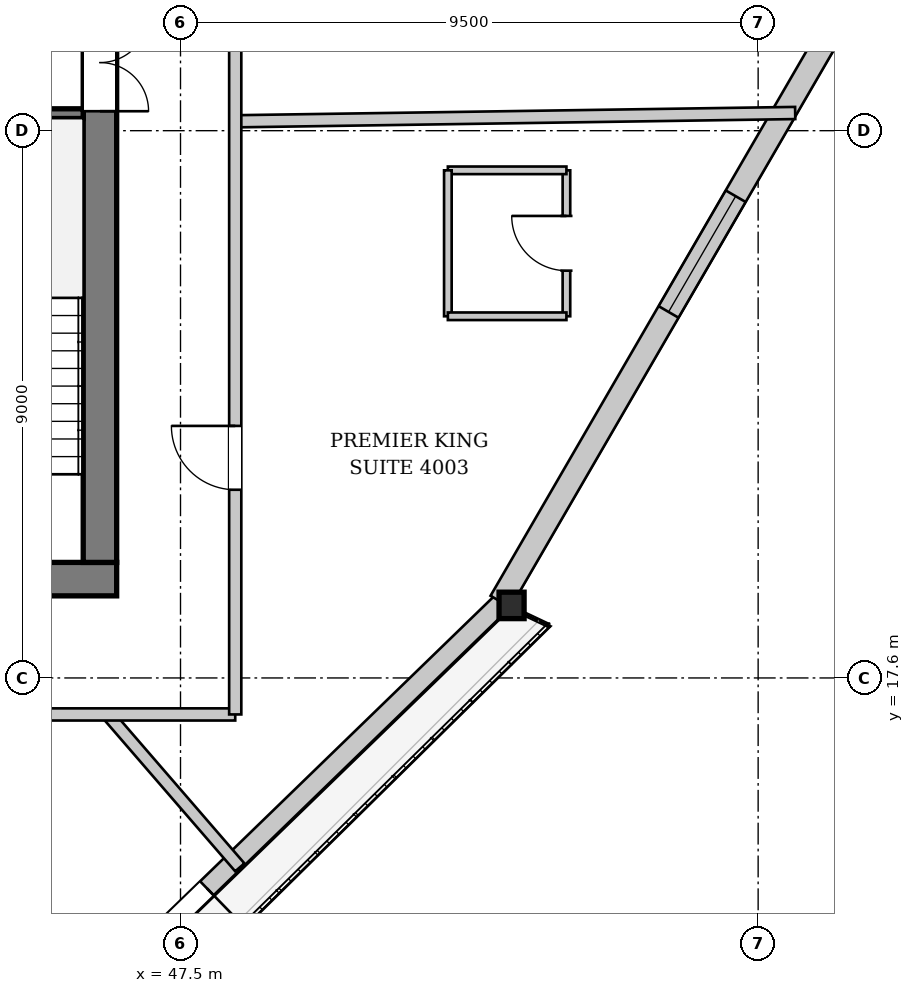
"""IFC4 building model, lengths in metres.
Left out: names, types, materials, properties, quantities, classifications, styles, units other than length and angle.
Written with IfcOpenShell. Run it as: python <this file> out.ifc"""

import sys

from ifc_helpers import new_model, si_unit, direction, frame, frame_2d, origin, origin_2d, place, context, subcontext, project, spatial, rectangle, i_section, extrude, source, transform, mapped, element, fill, save


model = new_model("IFC4")
c1 = context("Model", 3, precision=1e-05, world=origin(), true_north=direction((0.0, 1.0)))
c2 = subcontext(c1, "Body", "Model", "MODEL_VIEW")
j1 = project(units=[si_unit("LENGTHUNIT", "METRE"), si_unit("PLANEANGLEUNIT", "RADIAN")], contexts=[c1])
p1 = place(None, origin())
s1 = spatial("IfcSite", under=j1, at=p1, CompositionType="ELEMENT")
p2 = place(p1, origin())
s2 = spatial("IfcBuilding", under=s1, at=p2, CompositionType="ELEMENT")
p3 = place(p2, frame((0.0, 0.0, 153.7)))
s3 = spatial("IfcBuildingStorey", under=s2, at=p3, CompositionType="ELEMENT", Elevation=153.7)
m1 = source(origin(), c2, "Body", "SweptSolid", [
    extrude(i_section(OverallWidth=0.412, OverallDepth=0.435, WebThickness=0.031, FlangeThickness=0.05, at=origin_2d()), origin(), (0.0, 0.0, 1.0), 3.386),
])
p4 = place(p3, frame((52.928, 18.76, 0.0), z_axis=(0.010094981333, 0.019252571542, 0.999763686999), x_axis=(-0.885636687286, 0.464378787341, 0.0)))
e1 = element("IfcColumn", 1, at=p4, inside=s3, PredefinedType="COLUMN", context=c2, shape_type="MappedRepresentation", body=[
    mapped(m1, transform((0.0, 0.0, 0.0), x_axis=(1.0, 0.0, 0.0), y_axis=(0.0, 1.0, 0.0), z_axis=(0.0, 0.0, 1.0), scale=1.0)),
])
p5 = place(p3, frame((52.816, 18.875, 0.0), z_axis=(0.0, 0.0, 1.0), x_axis=(-0.717927185301, -0.696118205914, 0.0)))
e2 = element("IfcWall", 2, at=p5, inside=s3, PredefinedType="SOLIDWALL", context=c2, shape_type="SweptSolid", body=[
    extrude(rectangle(XDim=23.598, YDim=0.32, at=frame_2d((11.799, 0.0))), origin(), (0.0, 0.0, 1.0), 2.692),
])
p6 = place(p5, frame((6.801, 0.0, 0.0)))
e3 = element("IfcOpeningElement", 3, at=p6, cuts=e2, PredefinedType="OPENING", context=c2, shape_type="SweptSolid", body=[
    extrude(rectangle(XDim=1.5, YDim=2.3, at=frame_2d((0.75, 1.15))), frame((0.0, 0.17, 0.0), z_axis=(0.0, -1.0, 0.0), x_axis=(1.0, 0.0, 0.0)), (0.0, 0.0, 1.0), 0.34),
])
p7 = place(p5, frame((16.163, 0.0, 0.25)))
e4 = element("IfcOpeningElement", 4, at=p7, cuts=e2, PredefinedType="OPENING", context=c2, shape_type="SweptSolid", body=[
    extrude(rectangle(XDim=2.6, YDim=2.35, at=frame_2d((1.3, 1.175))), frame((0.0, 0.17, 0.0), z_axis=(0.0, -1.0, 0.0), x_axis=(1.0, 0.0, 0.0)), (0.0, 0.0, 1.0), 0.34),
])
p8 = place(p3, frame((64.604, 39.268, 0.0), z_axis=(0.0, 0.0, 1.0), x_axis=(-0.501770576444, -0.865000744864, 0.0)))
e5 = element("IfcWall", 5, at=p8, inside=s3, PredefinedType="SOLIDWALL", context=c2, shape_type="SweptSolid", body=[
    extrude(rectangle(XDim=23.598, YDim=0.38, at=frame_2d((11.799, 0.0))), origin(), (0.0, 0.0, 1.0), 2.692),
])
p9 = place(p8, frame((5.507, 0.0, 0.322)))
e6 = element("IfcOpeningElement", 6, at=p9, cuts=e5, PredefinedType="OPENING", context=c2, shape_type="SweptSolid", body=[
    extrude(rectangle(XDim=2.2, YDim=2.25, at=frame_2d((1.1, 1.125))), frame((0.0, 0.2, 0.0), z_axis=(0.0, -1.0, 0.0), x_axis=(1.0, 0.0, 0.0)), (0.0, 0.0, 1.0), 0.4),
])
p10 = place(p8, frame((15.891, 0.0, 0.322)))
e7 = element("IfcOpeningElement", 7, at=p10, cuts=e5, PredefinedType="OPENING", context=c2, shape_type="SweptSolid", body=[
    extrude(rectangle(XDim=2.2, YDim=2.25, at=frame_2d((1.1, 1.125))), frame((0.0, 0.2, 0.0), z_axis=(0.0, -1.0, 0.0), x_axis=(1.0, 0.0, 0.0)), (0.0, 0.0, 1.0), 0.4),
])
p11 = place(p3, frame((46.45, 19.225, 0.0), z_axis=(0.0, 0.0, 1.0), x_axis=(-1.0, 0.0, 0.0)))
e8 = element("IfcWall", 8, at=p11, inside=s3, PredefinedType="SHEAR", context=c2, shape_type="SweptSolid", body=[
    extrude(rectangle(XDim=16.9, YDim=0.55, at=frame_2d((8.45, 0.0))), origin(), (0.0, 0.0, 1.0), 3.3),
])
p12 = place(p11, frame((4.65, 0.0, 0.0)))
e9 = element("IfcOpeningElement", 9, at=p12, cuts=e8, PredefinedType="OPENING", context=c2, shape_type="SweptSolid", body=[
    extrude(rectangle(XDim=1.12, YDim=2.25, at=frame_2d((0.56, 1.125))), frame((0.0, 0.285, 0.0), z_axis=(0.0, -1.0, 0.0), x_axis=(1.0, 0.0, 0.0)), (0.0, 0.0, 1.0), 0.57),
])
p13 = place(p11, frame((11.15, 0.0, 0.0)))
e10 = element("IfcOpeningElement", 10, at=p13, cuts=e8, PredefinedType="OPENING", context=c2, shape_type="SweptSolid", body=[
    extrude(rectangle(XDim=1.12, YDim=2.25, at=frame_2d((0.56, 1.125))), frame((0.0, 0.285, 0.0), z_axis=(0.0, -1.0, 0.0), x_axis=(1.0, 0.0, 0.0)), (0.0, 0.0, 1.0), 0.57),
])
p14 = place(p3, frame((46.175, 33.7, 0.0), z_axis=(0.0, 0.0, 1.0), x_axis=(0.0, -1.0, 0.0)))
e11 = element("IfcWall", 11, at=p14, inside=s3, PredefinedType="SHEAR", context=c2, shape_type="SweptSolid", body=[
    extrude(rectangle(XDim=14.2, YDim=0.55, at=frame_2d((7.1, 0.0))), origin(), (0.0, 0.0, 1.0), 3.3),
])
p15 = place(p14, frame((5.18, 0.0, 0.0)))
e12 = element("IfcOpeningElement", 12, at=p15, cuts=e11, PredefinedType="OPENING", context=c2, shape_type="SweptSolid", body=[
    extrude(rectangle(XDim=1.6, YDim=2.2, at=frame_2d((0.8, 1.1))), frame((0.0, 0.285, 0.0), z_axis=(0.0, -1.0, 0.0), x_axis=(1.0, 0.0, 0.0)), (0.0, 0.0, 1.0), 0.57),
])
p16 = place(p14, frame((2.05, 0.0, 0.0)))
e13 = element("IfcOpeningElement", 13, at=p16, cuts=e11, PredefinedType="OPENING", context=c2, shape_type="SweptSolid", body=[
    extrude(rectangle(XDim=0.95, YDim=2.1, at=frame_2d((0.475, 1.05))), frame((0.0, 0.285, 0.0), z_axis=(0.0, -1.0, 0.0), x_axis=(1.0, 0.0, 0.0)), (0.0, 0.0, 1.0), 0.57),
])
p17 = place(p3, frame((42.88, 26.88, 0.0), z_axis=(0.0, 0.0, 1.0), x_axis=(1.0, 0.0, 0.0)))
e14 = element("IfcWall", 14, at=p17, inside=s3, PredefinedType="PARTITIONING", context=c2, shape_type="SweptSolid", body=[
    extrude(rectangle(XDim=3.02, YDim=0.16, at=frame_2d((1.51, 0.0))), origin(), (0.0, 0.0, 1.0), 3.3),
])
p18 = place(p3, frame((46.301, 17.0, 0.0), z_axis=(0.0, 0.0, 1.0), x_axis=(0.654105377462, -0.756403434137, 0.0)))
e15 = element("IfcWall", 15, at=p18, inside=s3, PredefinedType="PARTITIONING", context=c2, shape_type="SweptSolid", body=[
    extrude(rectangle(XDim=3.324, YDim=0.2, at=frame_2d((1.662, 0.0))), origin(), (0.0, 0.0, 1.0), 3.3),
])
p19 = place(p3, frame((48.4, 26.754, 0.0), z_axis=(0.0, 0.0, 1.0), x_axis=(0.999890217611, 0.014817311692, 0.0)))
e16 = element("IfcWall", 16, at=p19, inside=s3, PredefinedType="PARTITIONING", context=c2, shape_type="SweptSolid", body=[
    extrude(rectangle(XDim=9.21, YDim=0.2, at=frame_2d((4.605, 0.0))), origin(), (0.0, 0.0, 1.0), 3.3),
])
p20 = place(p3, frame((53.847, 23.548, 0.0), z_axis=(0.0, 0.0, 1.0), x_axis=(0.0, 1.0, 0.0)))
e17 = element("IfcWall", 17, at=p20, inside=s3, PredefinedType="PARTITIONING", context=c2, shape_type="SweptSolid", body=[
    extrude(rectangle(XDim=2.4, YDim=0.125, at=frame_2d((1.2, 0.0))), origin(), (0.0, 0.0, 1.0), 3.3),
])
p21 = place(p20, frame((0.75, 0.0, 0.0)))
e18 = element("IfcOpeningElement", 18, at=p21, cuts=e17, PredefinedType="OPENING", context=c2, shape_type="SweptSolid", body=[
    extrude(rectangle(XDim=0.9, YDim=2.1, at=frame_2d((0.45, 1.05))), frame((0.0, 0.073, 0.0), z_axis=(0.0, -1.0, 0.0), x_axis=(1.0, 0.0, 0.0)), (0.0, 0.0, 1.0), 0.145),
])
p22 = place(p3, frame((53.847, 25.948, 0.0), z_axis=(0.0, 0.0, 1.0), x_axis=(-1.0, 0.0, 0.0)))
e19 = element("IfcWall", 19, at=p22, inside=s3, PredefinedType="PARTITIONING", context=c2, shape_type="SweptSolid", body=[
    extrude(rectangle(XDim=1.95, YDim=0.125, at=frame_2d((0.975, 0.0))), origin(), (0.0, 0.0, 1.0), 3.3),
])
p23 = place(p3, frame((51.897, 25.948, 0.0), z_axis=(0.0, 0.0, 1.0), x_axis=(0.0, -1.0, 0.0)))
e20 = element("IfcWall", 20, at=p23, inside=s3, PredefinedType="PARTITIONING", context=c2, shape_type="SweptSolid", body=[
    extrude(rectangle(XDim=2.4, YDim=0.125, at=frame_2d((1.2, 0.0))), origin(), (0.0, 0.0, 1.0), 3.3),
])
p24 = place(p3, frame((51.897, 23.548, 0.0), z_axis=(0.0, 0.0, 1.0), x_axis=(1.0, 0.0, 0.0)))
e21 = element("IfcWall", 21, at=p24, inside=s3, PredefinedType="PARTITIONING", context=c2, shape_type="SweptSolid", body=[
    extrude(rectangle(XDim=1.95, YDim=0.125, at=frame_2d((0.975, 0.0))), origin(), (0.0, 0.0, 1.0), 3.3),
])
p25 = place(p3, frame((27.6, 17.0, 0.0), z_axis=(0.0, 0.0, 1.0), x_axis=(1.0, 0.0, 0.0)))
e22 = element("IfcWall", 22, at=p25, inside=s3, PredefinedType="PARTITIONING", context=c2, shape_type="SweptSolid", body=[
    extrude(rectangle(XDim=20.8, YDim=0.2, at=frame_2d((10.4, 0.0))), origin(), (0.0, 0.0, 1.0), 3.3),
])
p26 = place(p25, frame((11.885, 0.0, 0.0)))
e23 = element("IfcOpeningElement", 23, at=p26, cuts=e22, PredefinedType="OPENING", context=c2, shape_type="SweptSolid", body=[
    extrude(rectangle(XDim=1.05, YDim=2.2, at=frame_2d((0.525, 1.1))), frame((0.0, 0.11, 0.0), z_axis=(0.0, -1.0, 0.0), x_axis=(1.0, 0.0, 0.0)), (0.0, 0.0, 1.0), 0.22),
])
p27 = place(p3, frame((48.4, 17.0, 0.0), z_axis=(0.0, 0.0, 1.0), x_axis=(0.0, 1.0, 0.0)))
e24 = element("IfcWall", 24, at=p27, inside=s3, PredefinedType="PARTITIONING", context=c2, shape_type="SweptSolid", body=[
    extrude(rectangle(XDim=19.2, YDim=0.2, at=frame_2d((9.6, 0.0))), origin(), (0.0, 0.0, 1.0), 3.3),
])
p28 = place(p27, frame((3.695, 0.0, 0.0)))
e25 = element("IfcOpeningElement", 25, at=p28, cuts=e24, PredefinedType="OPENING", context=c2, shape_type="SweptSolid", body=[
    extrude(rectangle(XDim=1.05, YDim=2.2, at=frame_2d((0.525, 1.1))), frame((0.0, 0.11, 0.0), z_axis=(0.0, -1.0, 0.0), x_axis=(1.0, 0.0, 0.0)), (0.0, 0.0, 1.0), 0.22),
])
p29 = place(p27, frame((14.018, 0.0, 0.0)))
e26 = element("IfcOpeningElement", 26, at=p29, cuts=e24, PredefinedType="OPENING", context=c2, shape_type="SweptSolid", body=[
    extrude(rectangle(XDim=1.05, YDim=2.2, at=frame_2d((0.525, 1.1))), frame((0.0, 0.11, 0.0), z_axis=(0.0, -1.0, 0.0), x_axis=(1.0, 0.0, 0.0)), (0.0, 0.0, 1.0), 0.22),
])
m2 = source(origin(), c2, "Body", "SweptSolid", [
    extrude(rectangle(XDim=1.5, YDim=2.3, at=frame_2d((0.75, 1.15))), frame((0.0, 0.025, 0.0), z_axis=(0.0, -1.0, 0.0), x_axis=(1.0, 0.0, 0.0)), (0.0, 0.0, 1.0), 0.05),
])
p30 = place(p6, origin())
e27 = element("IfcDoor", 27, at=p30, inside=s3, OperationType="DOUBLE_DOOR_SINGLE_SWING", PredefinedType="DOOR", context=c2, shape_type="MappedRepresentation", body=[
    mapped(m2, transform((0.0, 0.0, 0.0), x_axis=(1.0, 0.0, 0.0), y_axis=(0.0, 1.0, 0.0), z_axis=(0.0, 0.0, 1.0), scale=1.0)),
])
fill(e3, e27)
m3 = source(origin(), c2, "Body", "SweptSolid", [
    extrude(rectangle(XDim=2.2, YDim=2.25, at=frame_2d((1.1, 1.125))), frame((0.0, 0.03, 0.0), z_axis=(0.0, -1.0, 0.0), x_axis=(1.0, 0.0, 0.0)), (0.0, 0.0, 1.0), 0.06),
])
p31 = place(p10, origin())
e28 = element("IfcWindow", 28, at=p31, inside=s3, PartitioningType="SINGLE_PANEL", PredefinedType="WINDOW", context=c2, shape_type="MappedRepresentation", body=[
    mapped(m3, transform((0.0, 0.0, 0.0), x_axis=(1.0, 0.0, 0.0), y_axis=(0.0, 1.0, 0.0), z_axis=(0.0, 0.0, 1.0), scale=1.0)),
])
fill(e7, e28)
m4 = source(origin(), c2, "Body", "SweptSolid", [
    extrude(rectangle(XDim=1.6, YDim=2.2, at=frame_2d((0.8, 1.1))), frame((0.0, 0.025, 0.0), z_axis=(0.0, -1.0, 0.0), x_axis=(1.0, 0.0, 0.0)), (0.0, 0.0, 1.0), 0.05),
])
p32 = place(p15, origin())
e29 = element("IfcDoor", 29, at=p32, inside=s3, OperationType="DOUBLE_DOOR_SINGLE_SWING", PredefinedType="DOOR", context=c2, shape_type="MappedRepresentation", body=[
    mapped(m4, transform((0.0, 0.0, 0.0), x_axis=(1.0, 0.0, 0.0), y_axis=(0.0, 1.0, 0.0), z_axis=(0.0, 0.0, 1.0), scale=1.0)),
])
fill(e12, e29)
m5 = source(origin(), c2, "Body", "SweptSolid", [
    extrude(rectangle(XDim=0.9, YDim=2.1, at=frame_2d((0.45, 1.05))), frame((0.0, 0.025, 0.0), z_axis=(0.0, -1.0, 0.0), x_axis=(1.0, 0.0, 0.0)), (0.0, 0.0, 1.0), 0.05),
])
p33 = place(p21, origin())
e30 = element("IfcDoor", 30, at=p33, inside=s3, OperationType="SINGLE_SWING_RIGHT", PredefinedType="DOOR", context=c2, shape_type="MappedRepresentation", body=[
    mapped(m5, transform((0.0, 0.0, 0.0), x_axis=(1.0, 0.0, 0.0), y_axis=(0.0, 1.0, 0.0), z_axis=(0.0, 0.0, 1.0), scale=1.0)),
])
fill(e18, e30)
m6 = source(origin(), c2, "Body", "SweptSolid", [
    extrude(rectangle(XDim=1.05, YDim=2.2, at=frame_2d((0.525, 1.1))), frame((0.0, 0.025, 0.0), z_axis=(0.0, -1.0, 0.0), x_axis=(1.0, 0.0, 0.0)), (0.0, 0.0, 1.0), 0.05),
])
p34 = place(p28, origin())
e31 = element("IfcDoor", 31, at=p34, inside=s3, OperationType="SINGLE_SWING_RIGHT", PredefinedType="DOOR", context=c2, shape_type="MappedRepresentation", body=[
    mapped(m6, transform((0.0, 0.0, 0.0), x_axis=(1.0, 0.0, 0.0), y_axis=(0.0, 1.0, 0.0), z_axis=(0.0, 0.0, 1.0), scale=1.0)),
])
fill(e25, e31)
save(model, sys.argv[1])
